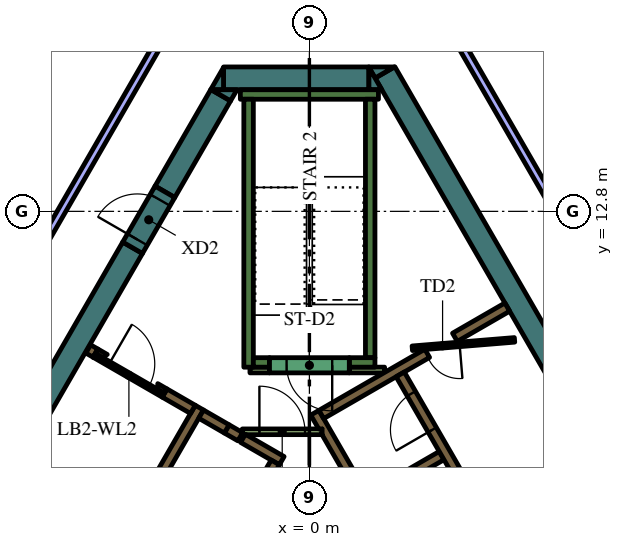
"""IFC4 building model, lengths in metres.
Left out: names, types, materials, properties, quantities, classifications, styles, units other than length and angle.
Written with IfcOpenShell. Run it as: python <this file> out.ifc"""

import sys

from ifc_helpers import new_model, si_unit, direction, frame, frame_2d, origin, place, context, subcontext, project, spatial, polyline, rectangle, outline, extrude, element, fill, save


model = new_model("IFC4")
c1 = context("Model", 3, precision=1e-05, world=origin(), true_north=direction((0.0, 1.0)))
c2 = subcontext(c1, "Body", "Model", "MODEL_VIEW")
j1 = project(units=[si_unit("LENGTHUNIT", "METRE"), si_unit("PLANEANGLEUNIT", "RADIAN")], contexts=[c1])
p1 = place(None, origin())
s1 = spatial("IfcSite", under=j1, at=p1, CompositionType="ELEMENT")
p2 = place(p1, origin())
s2 = spatial("IfcBuilding", under=s1, at=p2, CompositionType="ELEMENT")
p3 = place(p2, frame((0.0, 0.0, 288.0)))
s3 = spatial("IfcBuildingStorey", under=s2, at=p3, CompositionType="ELEMENT", Elevation=288.0)
p4 = place(p3, frame((1.989, 16.456, 0.0), z_axis=(0.0, 0.0, 1.0), x_axis=(0.49999102663, -0.8660305845, 0.0)))
e1 = element("IfcWall", 1, at=p4, inside=s3, PredefinedType="SOLIDWALL", context=c2, shape_type="SweptSolid", body=[
    extrude(rectangle(XDim=12.406, YDim=0.6, at=frame_2d((6.203, 0.0))), origin(), (0.0, 0.0, 1.0), 4.2),
])
p5 = place(p3, origin())
e2 = element("IfcWall", 2, at=p5, inside=s3, PredefinedType="SOLIDWALL", context=c2, shape_type="SweptSolid", body=[
    extrude(outline(polyline([(1.559, 16.6), (2.235, 16.6), (1.728, 16.307), (1.559, 16.6)])), origin(), (0.0, 0.0, 1.0), 4.2),
])
p6 = place(p3, frame((-2.258, 16.3, 0.0), z_axis=(0.0, 0.0, 1.0), x_axis=(1.0, 0.0, 0.0)))
e3 = element("IfcWall", 3, at=p6, inside=s3, PredefinedType="SOLIDWALL", context=c2, shape_type="SweptSolid", body=[
    extrude(rectangle(XDim=3.823, YDim=0.6, at=frame_2d((1.912, 0.0))), origin(), (0.0, 0.0, 1.0), 4.2),
])
e4 = element("IfcWall", 4, at=p5, inside=s3, PredefinedType="SOLIDWALL", context=c2, shape_type="SweptSolid", body=[
    extrude(outline(polyline([(1.905, 16.0), (1.567, 16.0), (1.567, 16.585), (1.905, 16.0)])), origin(), (0.0, 0.0, 1.0), 4.2),
])
e5 = element("IfcWall", 5, at=p5, inside=s3, PredefinedType="SOLIDWALL", context=c2, shape_type="SweptSolid", body=[
    extrude(outline(polyline([(-2.598, 16.0), (-2.26, 16.585), (-2.26, 16.0), (-2.598, 16.0)])), origin(), (0.0, 0.0, 1.0), 4.2),
])
p7 = place(p3, frame((-2.335, 15.855, 0.0), z_axis=(0.0, 0.0, 1.0), x_axis=(-0.499960127962, -0.866048422692, 0.0)))
e6 = element("IfcWall", 6, at=p7, inside=s3, PredefinedType="SOLIDWALL", context=c2, shape_type="SweptSolid", body=[
    extrude(rectangle(XDim=2.934, YDim=0.6, at=frame_2d((1.467, 0.0))), origin(), (0.0, 0.0, 1.0), 4.2),
])
e7 = element("IfcWall", 7, at=p5, inside=s3, PredefinedType="SOLIDWALL", context=c2, shape_type="SweptSolid", body=[
    extrude(outline(polyline([(-1.905, 16.0), (-2.074, 15.707), (-2.581, 16.0), (-1.905, 16.0)])), origin(), (0.0, 0.0, 1.0), 4.2),
])
e8 = element("IfcWall", 8, at=p5, inside=s3, PredefinedType="SOLIDWALL", context=c2, shape_type="SweptSolid", body=[
    extrude(outline(polyline([(-15.502, -6.35), (-4.912, 11.992), (-4.393, 11.692), (-10.815, 0.569), (-10.84, 0.583), (-10.84, 0.583), (-10.84, 0.583), (-10.965, 0.367), (-10.965, 0.367), (-10.965, 0.367), (-10.94, 0.352), (-11.033, 0.191), (-14.809, -6.35), (-15.156, -6.95), (-15.502, -6.35)])), origin(), (0.0, 0.0, 1.0), 4.2),
])
p8 = place(p3, frame((-1.817, 15.875, 0.0), z_axis=(0.0, 0.0, 1.0), x_axis=(1.0, 0.0, 0.0)))
e9 = element("IfcWall", 9, at=p8, inside=s3, PredefinedType="SOLIDWALL", context=c2, shape_type="SweptSolid", body=[
    extrude(rectangle(XDim=3.634, YDim=0.25, at=frame_2d((1.817, 0.0))), origin(), (0.0, 0.0, 1.0), 4.2),
])
p9 = place(p3, frame((1.6, 8.95, 0.0), z_axis=(0.0, 0.0, 1.0), x_axis=(0.0, 1.0, 0.0)))
e10 = element("IfcWall", 10, at=p9, inside=s3, PredefinedType="SOLIDWALL", context=c2, shape_type="SweptSolid", body=[
    extrude(rectangle(XDim=6.8, YDim=0.25, at=frame_2d((3.4, 0.0))), origin(), (0.0, 0.0, 1.0), 4.2),
])
p10 = place(p3, frame((1.05, 8.825, 0.0), z_axis=(0.0, 0.0, 1.0), x_axis=(1.0, 0.0, 0.0)))
e11 = element("IfcWall", 11, at=p10, inside=s3, PredefinedType="SOLIDWALL", context=c2, shape_type="SweptSolid", body=[
    extrude(rectangle(XDim=0.675, YDim=0.25, at=frame_2d((0.337, 0.0))), origin(), (0.0, 0.0, 1.0), 4.2),
])
p11 = place(p3, frame((-1.6, 8.7, 0.0), z_axis=(0.0, 0.0, 1.0), x_axis=(0.0, 1.0, 0.0)))
e12 = element("IfcWall", 12, at=p11, inside=s3, PredefinedType="SOLIDWALL", context=c2, shape_type="SweptSolid", body=[
    extrude(rectangle(XDim=7.05, YDim=0.25, at=frame_2d((3.525, 0.0))), origin(), (0.0, 0.0, 1.0), 4.2),
])
p12 = place(p3, frame((-1.475, 8.825, 0.0), z_axis=(0.0, 0.0, 1.0), x_axis=(1.0, 0.0, 0.0)))
e13 = element("IfcWall", 13, at=p12, inside=s3, PredefinedType="SOLIDWALL", context=c2, shape_type="SweptSolid", body=[
    extrude(rectangle(XDim=0.425, YDim=0.25, at=frame_2d((0.212, 0.0))), origin(), (0.0, 0.0, 1.0), 4.2),
])
e14 = element("IfcWall", 14, at=p5, inside=s3, PredefinedType="SOLIDWALL", context=c2, shape_type="SweptSolid", body=[
    extrude(outline(polyline([(0.332, 6.925), (0.335, 6.925), (0.335, 6.925), (0.335, 6.925), (0.335, 7.075), (0.335, 7.075), (0.335, 7.075), (0.245, 7.075), (0.035, 7.439), (0.252, 7.564), (0.377, 7.348), (1.512, 5.382), (1.637, 5.165), (2.221, 4.153), (2.771, 3.199), (2.896, 2.983), (3.138, 2.564), (4.031, 1.017), (4.156, 0.801), (5.292, -1.165), (5.417, -1.382), (6.073, -2.519), (6.552, -3.348), (6.677, -3.564), (6.46, -3.689), (0.332, 6.925)])), origin(), (0.0, 0.0, 1.0), 4.2),
])
p13 = place(p3, frame((3.1, 9.064, 0.0), z_axis=(0.0, 0.0, 1.0), x_axis=(-0.866030133475, -0.499991807846, 0.0)))
e15 = element("IfcWall", 15, at=p13, inside=s3, PredefinedType="SOLIDWALL", context=c2, shape_type="SweptSolid", body=[
    extrude(rectangle(XDim=3.217, YDim=0.25, at=frame_2d((1.608, 0.0))), origin(), (0.0, 0.0, 1.0), 4.2),
])
p14 = place(p3, frame((1.574, 5.274, 0.0), z_axis=(0.0, 0.0, 1.0), x_axis=(0.866028486751, 0.499994660107, 0.0)))
e16 = element("IfcWall", 16, at=p14, inside=s3, PredefinedType="SOLIDWALL", context=c2, shape_type="SweptSolid", body=[
    extrude(rectangle(XDim=2.2, YDim=0.25, at=frame_2d((1.1, 0.0))), origin(), (0.0, 0.0, 1.0), 4.2),
])
p15 = place(p3, frame((3.83, 9.486, 0.0), z_axis=(0.0, 0.0, 1.0), x_axis=(0.865986202621, 0.500067892261, 0.0)))
e17 = element("IfcWall", 17, at=p15, inside=s3, PredefinedType="SOLIDWALL", context=c2, shape_type="SweptSolid", body=[
    extrude(rectangle(XDim=1.591, YDim=0.25, at=frame_2d((0.795, 0.0))), origin(), (0.0, 0.0, 1.0), 4.2),
])
p16 = place(p3, frame((-8.06, -1.311, 0.0), z_axis=(0.0, 0.0, 1.0), x_axis=(0.50000273126, 0.866023826885, 0.0)))
e18 = element("IfcWall", 18, at=p16, inside=s3, PredefinedType="SOLIDWALL", context=c2, shape_type="SweptSolid", body=[
    extrude(rectangle(XDim=10.33, YDim=0.25, at=frame_2d((5.165, 0.0))), origin(), (0.0, 0.0, 1.0), 4.2),
])
p17 = place(p3, frame((-1.819, 6.87, 0.0), z_axis=(0.0, 0.0, 1.0), x_axis=(-0.866294599386, 0.499533449405, 0.0)))
e19 = element("IfcWall", 19, at=p17, inside=s3, PredefinedType="SOLIDWALL", context=c2, shape_type="SweptSolid", body=[
    extrude(rectangle(XDim=0.41, YDim=0.25, at=frame_2d((0.205, 0.0))), origin(), (0.0, 0.0, 1.0), 4.2),
])
p18 = place(p3, frame((-2.849, 7.465, 0.0), z_axis=(0.0, 0.0, 1.0), x_axis=(0.865955664968, -0.500120771724, 0.0)))
e20 = element("IfcWall", 20, at=p18, inside=s3, PredefinedType="SOLIDWALL", context=c2, shape_type="SweptSolid", body=[
    extrude(rectangle(XDim=0.778, YDim=0.25, at=frame_2d((0.389, 0.0))), origin(), (0.0, 0.0, 1.0), 4.2),
])
p19 = place(p3, frame((-0.728, 6.24, 0.0), z_axis=(0.0, 0.0, 1.0), x_axis=(-0.866002680491, 0.500039355833, 0.0)))
e21 = element("IfcWall", 21, at=p19, inside=s3, PredefinedType="SOLIDWALL", context=c2, shape_type="SweptSolid", body=[
    extrude(rectangle(XDim=1.178, YDim=0.25, at=frame_2d((0.589, 0.0))), origin(), (0.0, 0.0, 1.0), 4.2),
])
p20 = place(p3, frame((-5.629, 9.07, 0.0), z_axis=(0.0, 0.0, 1.0), x_axis=(-0.866185586049, 0.49972245349, 0.0)))
e22 = element("IfcWall", 22, at=p20, inside=s3, PredefinedType="SOLIDWALL", context=c2, shape_type="SweptSolid", body=[
    extrude(rectangle(XDim=0.22, YDim=0.25, at=frame_2d((0.11, 0.0))), origin(), (0.0, 0.0, 1.0), 4.2),
])
p21 = place(p3, frame((-3.809, 8.019, 0.0), z_axis=(0.0, 0.0, 1.0), x_axis=(0.866010229787, -0.500026281214, 0.0)))
e23 = element("IfcWall", 23, at=p21, inside=s3, PredefinedType="SOLIDWALL", context=c2, shape_type="SweptSolid", body=[
    extrude(rectangle(XDim=0.858, YDim=0.25, at=frame_2d((0.429, 0.0))), origin(), (0.0, 0.0, 1.0), 4.2),
])
e24 = element("IfcWall", 24, at=p5, inside=s3, PredefinedType="SOLIDWALL", context=c2, shape_type="SweptSolid", body=[
    extrude(outline(polyline([(-3.748, 8.128), (-3.813, 8.015), (-4.027, 8.139), (-4.017, 8.156), (-4.008, 8.173), (-4.0, 8.192), (-3.995, 8.21), (-3.991, 8.23), (-3.99, 8.25), (-3.99, 8.268), (-3.748, 8.128)])), origin(), (0.0, 0.0, 1.0), 4.2),
])
e25 = element("IfcWall", 25, at=p5, inside=s3, PredefinedType="SOLIDWALL", context=c2, shape_type="SweptSolid", body=[
    extrude(outline(polyline([(-5.689, 8.96), (-5.69, 8.961), (-5.565, 9.177), (-5.319, 9.035), (-5.335, 9.026), (-5.351, 9.015), (-5.366, 9.002), (-5.379, 8.988), (-5.392, 8.972), (-5.402, 8.956), (-5.412, 8.939), (-5.629, 9.064), (-5.629, 9.064), (-5.689, 8.96)])), origin(), (0.0, 0.0, 1.0), 4.2),
])
p22 = place(p3, frame((1.05, 8.625, 0.0), z_axis=(0.0, 0.0, 1.0), x_axis=(1.0, 0.0, 0.0)))
e26 = element("IfcWall", 26, at=p22, inside=s3, PredefinedType="PARTITIONING", context=c2, shape_type="SweptSolid", body=[
    extrude(rectangle(XDim=0.929, YDim=0.15, at=frame_2d((0.464, 0.0))), origin(), (0.0, 0.0, 1.0), 3.55),
])
p23 = place(p3, frame((-1.564, 8.625, 0.0), z_axis=(0.0, 0.0, 1.0), x_axis=(1.0, 0.0, 0.0)))
e27 = element("IfcWall", 27, at=p23, inside=s3, PredefinedType="PARTITIONING", context=c2, shape_type="SweptSolid", body=[
    extrude(rectangle(XDim=0.514, YDim=0.15, at=frame_2d((0.257, 0.0))), origin(), (0.0, 0.0, 1.0), 3.55),
])
p24 = place(p3, frame((8.565, -2.185, 0.0), z_axis=(0.0, 0.0, 1.0), x_axis=(-0.499997954832, 0.866026584559, 0.0)))
e28 = element("IfcWall", 28, at=p24, inside=s3, PredefinedType="SOLIDWALL", context=c2, shape_type="SweptSolid", body=[
    extrude(rectangle(XDim=12.35, YDim=0.25, at=frame_2d((6.175, 0.0))), origin(), (0.0, 0.0, 1.0), 4.2),
])
p25 = place(p24, frame((0.685, 0.0, 0.0)))
e29 = element("IfcOpeningElement", 29, at=p25, cuts=e28, PredefinedType="OPENING", context=c2, shape_type="SweptSolid", body=[
    extrude(rectangle(XDim=0.9, YDim=2.1, at=frame_2d((0.45, 1.05))), frame((0.0, 0.135, 0.0), z_axis=(0.0, -1.0, 0.0), x_axis=(1.0, 0.0, 0.0)), (0.0, 0.0, 1.0), 0.27),
])
p26 = place(p24, frame((3.105, 0.0, 0.0)))
e30 = element("IfcOpeningElement", 30, at=p26, cuts=e28, PredefinedType="OPENING", context=c2, shape_type="SweptSolid", body=[
    extrude(rectangle(XDim=1.1, YDim=2.1, at=frame_2d((0.55, 1.05))), frame((0.0, 0.135, 0.0), z_axis=(0.0, -1.0, 0.0), x_axis=(1.0, 0.0, 0.0)), (0.0, 0.0, 1.0), 0.27),
])
p27 = place(p24, frame((5.625, 0.0, 0.0)))
e31 = element("IfcOpeningElement", 31, at=p27, cuts=e28, PredefinedType="OPENING", context=c2, shape_type="SweptSolid", body=[
    extrude(rectangle(XDim=1.1, YDim=2.1, at=frame_2d((0.55, 1.05))), frame((0.0, 0.135, 0.0), z_axis=(0.0, -1.0, 0.0), x_axis=(1.0, 0.0, 0.0)), (0.0, 0.0, 1.0), 0.27),
])
p28 = place(p24, frame((8.145, 0.0, 0.0)))
e32 = element("IfcOpeningElement", 32, at=p28, cuts=e28, PredefinedType="OPENING", context=c2, shape_type="SweptSolid", body=[
    extrude(rectangle(XDim=1.1, YDim=2.1, at=frame_2d((0.55, 1.05))), frame((0.0, 0.135, 0.0), z_axis=(0.0, -1.0, 0.0), x_axis=(1.0, 0.0, 0.0)), (0.0, 0.0, 1.0), 0.27),
])
p29 = place(p24, frame((10.665, 0.0, 0.0)))
e33 = element("IfcOpeningElement", 33, at=p29, cuts=e28, PredefinedType="OPENING", context=c2, shape_type="SweptSolid", body=[
    extrude(rectangle(XDim=1.1, YDim=2.1, at=frame_2d((0.55, 1.05))), frame((0.0, 0.135, 0.0), z_axis=(0.0, -1.0, 0.0), x_axis=(1.0, 0.0, 0.0)), (0.0, 0.0, 1.0), 0.27),
])
p30 = place(p3, frame((-0.898, 6.194, 0.0), z_axis=(0.0, 0.0, 1.0), x_axis=(-0.499996202215, -0.866027596426, 0.0)))
e34 = element("IfcWall", 34, at=p30, inside=s3, PredefinedType="SOLIDWALL", context=c2, shape_type="SweptSolid", body=[
    extrude(rectangle(XDim=9.83, YDim=0.25, at=frame_2d((4.915, 0.0))), origin(), (0.0, 0.0, 1.0), 4.2),
])
p31 = place(p30, frame((0.585, 0.0, 0.0)))
e35 = element("IfcOpeningElement", 35, at=p31, cuts=e34, PredefinedType="OPENING", context=c2, shape_type="SweptSolid", body=[
    extrude(rectangle(XDim=1.1, YDim=2.1, at=frame_2d((0.55, 1.05))), frame((0.0, 0.135, 0.0), z_axis=(0.0, -1.0, 0.0), x_axis=(1.0, 0.0, 0.0)), (0.0, 0.0, 1.0), 0.27),
])
p32 = place(p30, frame((3.105, 0.0, 0.0)))
e36 = element("IfcOpeningElement", 36, at=p32, cuts=e34, PredefinedType="OPENING", context=c2, shape_type="SweptSolid", body=[
    extrude(rectangle(XDim=1.1, YDim=2.1, at=frame_2d((0.55, 1.05))), frame((0.0, 0.135, 0.0), z_axis=(0.0, -1.0, 0.0), x_axis=(1.0, 0.0, 0.0)), (0.0, 0.0, 1.0), 0.27),
])
p33 = place(p30, frame((5.625, 0.0, 0.0)))
e37 = element("IfcOpeningElement", 37, at=p33, cuts=e34, PredefinedType="OPENING", context=c2, shape_type="SweptSolid", body=[
    extrude(rectangle(XDim=1.1, YDim=2.1, at=frame_2d((0.55, 1.05))), frame((0.0, 0.135, 0.0), z_axis=(0.0, -1.0, 0.0), x_axis=(1.0, 0.0, 0.0)), (0.0, 0.0, 1.0), 0.27),
])
p34 = place(p30, frame((8.145, 0.0, 0.0)))
e38 = element("IfcOpeningElement", 38, at=p34, cuts=e34, PredefinedType="OPENING", context=c2, shape_type="SweptSolid", body=[
    extrude(rectangle(XDim=1.1, YDim=2.1, at=frame_2d((0.55, 1.05))), frame((0.0, 0.135, 0.0), z_axis=(0.0, -1.0, 0.0), x_axis=(1.0, 0.0, 0.0)), (0.0, 0.0, 1.0), 0.27),
])
p35 = place(p3, frame((1.05, 8.75, 0.0), z_axis=(0.0, 0.0, 1.0), x_axis=(-1.0, 0.0, 0.0)))
e39 = element("IfcWall", 39, at=p35, inside=s3, PredefinedType="SOLIDWALL", context=c2, shape_type="SweptSolid", body=[
    extrude(rectangle(XDim=2.1, YDim=0.4, at=frame_2d((1.05, 0.0))), origin(), (0.0, 0.0, 1.0), 4.2),
])
p36 = place(p35, frame((0.45, 0.0, 0.0)))
e40 = element("IfcOpeningElement", 40, at=p36, cuts=e39, PredefinedType="OPENING", context=c2, shape_type="SweptSolid", body=[
    extrude(rectangle(XDim=1.2, YDim=2.1, at=frame_2d((0.6, 1.05))), frame((0.0, 0.21, 0.0), z_axis=(0.0, -1.0, 0.0), x_axis=(1.0, 0.0, 0.0)), (0.0, 0.0, 1.0), 0.42),
])
p37 = place(p3, frame((5.398, 9.419, 0.0), z_axis=(0.0, 0.0, 1.0), x_axis=(-0.996653416376, -0.081743303248, 0.0)))
e41 = element("IfcWall", 41, at=p37, inside=s3, PredefinedType="PARTITIONING", context=c2, shape_type="SweptSolid", body=[
    extrude(rectangle(XDim=2.7, YDim=0.12, at=frame_2d((1.35, 0.0))), origin(), (0.0, 0.0, 1.0), 3.55),
])
p38 = place(p37, frame((1.45, 0.0, 0.0)))
e42 = element("IfcOpeningElement", 42, at=p38, cuts=e41, PredefinedType="OPENING", context=c2, shape_type="SweptSolid", body=[
    extrude(rectangle(XDim=0.9, YDim=2.1, at=frame_2d((0.45, 1.05))), frame((0.0, 0.07, 0.0), z_axis=(0.0, -1.0, 0.0), x_axis=(1.0, 0.0, 0.0)), (0.0, 0.0, 1.0), 0.14),
])
p39 = place(p3, frame((-1.765, 7.0, 0.0), z_axis=(0.0, 0.0, 1.0), x_axis=(1.0, 0.0, 0.0)))
e43 = element("IfcWall", 43, at=p39, inside=s3, PredefinedType="PARTITIONING", context=c2, shape_type="SweptSolid", body=[
    extrude(rectangle(XDim=2.1, YDim=0.15, at=frame_2d((1.05, 0.0))), origin(), (0.0, 0.0, 1.0), 3.55),
])
p40 = place(p39, frame((0.45, 0.0, 0.0)))
e44 = element("IfcOpeningElement", 44, at=p40, cuts=e43, PredefinedType="OPENING", context=c2, shape_type="SweptSolid", body=[
    extrude(rectangle(XDim=1.2, YDim=2.1, at=frame_2d((0.6, 1.05))), frame((0.0, 0.085, 0.0), z_axis=(0.0, -1.0, 0.0), x_axis=(1.0, 0.0, 0.0)), (0.0, 0.0, 1.0), 0.17),
])
p41 = place(p3, frame((-5.659, 9.012, 0.0), z_axis=(0.0, 0.0, 1.0), x_axis=(0.866009402589, -0.500027713859, 0.0)))
e45 = element("IfcWall", 45, at=p41, inside=s3, PredefinedType="PARTITIONING", context=c2, shape_type="SweptSolid", body=[
    extrude(rectangle(XDim=2.1, YDim=0.12, at=frame_2d((1.05, 0.0))), origin(), (0.0, 0.0, 1.0), 3.55),
])
p42 = place(p41, frame((0.45, 0.0, 0.0)))
e46 = element("IfcOpeningElement", 46, at=p42, cuts=e45, PredefinedType="OPENING", context=c2, shape_type="SweptSolid", body=[
    extrude(rectangle(XDim=1.2, YDim=2.1, at=frame_2d((0.6, 1.05))), frame((0.0, 0.07, 0.0), z_axis=(0.0, -1.0, 0.0), x_axis=(1.0, 0.0, 0.0)), (0.0, 0.0, 1.0), 0.14),
])
p43 = place(p3, frame((-4.652, 11.842, 0.0), z_axis=(0.0, 0.0, 1.0), x_axis=(0.500062241894, 0.865989465428, 0.0)))
e47 = element("IfcWall", 47, at=p43, inside=s3, PredefinedType="SOLIDWALL", context=c2, shape_type="SweptSolid", body=[
    extrude(rectangle(XDim=1.7, YDim=0.6, at=frame_2d((0.85, 0.0))), origin(), (0.0, 0.0, 1.0), 4.2),
])
p44 = place(p43, frame((0.25, 0.0, 0.0)))
e48 = element("IfcOpeningElement", 48, at=p44, cuts=e47, PredefinedType="OPENING", context=c2, shape_type="SweptSolid", body=[
    extrude(rectangle(XDim=1.2, YDim=2.1, at=frame_2d((0.6, 1.05))), frame((0.0, 0.31, 0.0), z_axis=(0.0, -1.0, 0.0), x_axis=(1.0, 0.0, 0.0)), (0.0, 0.0, 1.0), 0.62),
])
p45 = place(p3, frame((7.421, 11.247, 0.0), z_axis=(0.0, 0.0, 1.0), x_axis=(-0.499999024953, 0.866025966727, 0.0)))
e49 = element("IfcWall", 49, at=p45, inside=s3, PredefinedType="PARTITIONING", context=c2, shape_type="SweptSolid", body=[
    extrude(rectangle(XDim=7.769, YDim=0.2, at=frame_2d((3.884, 0.0))), origin(), (0.0, 0.0, 1.0), 3.55),
])
p46 = place(p3, frame((-7.962, 15.8, 0.0), z_axis=(0.0, 0.0, 1.0), x_axis=(0.599541489613, 0.800343677574, 0.0)))
e50 = element("IfcWall", 50, at=p46, inside=s3, PredefinedType="PARTITIONING", context=c2, shape_type="SweptSolid", body=[
    extrude(rectangle(XDim=4.942, YDim=0.15, at=frame_2d((2.471, 0.0))), origin(), (0.0, 0.0, 1.0), 3.55),
])
p47 = place(p46, frame((2.042, 0.0, 0.0)))
e51 = element("IfcOpeningElement", 51, at=p47, cuts=e50, PredefinedType="OPENING", context=c2, shape_type="SweptSolid", body=[
    extrude(rectangle(XDim=0.9, YDim=2.1, at=frame_2d((0.45, 1.05))), frame((0.0, 0.085, 0.0), z_axis=(0.0, -1.0, 0.0), x_axis=(1.0, 0.0, 0.0)), (0.0, 0.0, 1.0), 0.17),
])
p48 = place(p3, frame((-3.306, 18.374, 0.0), z_axis=(0.0, 0.0, 1.0), x_axis=(-0.499999798456, -0.866025520146, 0.0)))
e52 = element("IfcWall", 52, at=p48, inside=s3, PredefinedType="PARTITIONING", context=c2, shape_type="SweptSolid", body=[
    extrude(rectangle(XDim=8.229, YDim=0.2, at=frame_2d((4.115, 0.0))), origin(), (0.0, 0.0, 1.0), 3.55),
])
p49 = place(p29, origin())
e53 = element("IfcDoor", 53, at=p49, inside=s3, OperationType="DOUBLE_DOOR_SLIDING", PredefinedType="DOOR", context=c2, shape_type="SweptSolid", body=[
    extrude(rectangle(XDim=1.1, YDim=2.1, at=frame_2d((0.55, 1.05))), frame((0.0, 0.025, 0.0), z_axis=(0.0, -1.0, 0.0), x_axis=(1.0, 0.0, 0.0)), (0.0, 0.0, 1.0), 0.05),
])
fill(e33, e53)
p50 = place(p36, origin())
e54 = element("IfcDoor", 54, at=p50, inside=s3, OperationType="SINGLE_SWING_LEFT", PredefinedType="DOOR", context=c2, shape_type="SweptSolid", body=[
    extrude(rectangle(XDim=1.2, YDim=2.1, at=frame_2d((0.6, 1.05))), frame((0.0, 0.025, 0.0), z_axis=(0.0, -1.0, 0.0), x_axis=(1.0, 0.0, 0.0)), (0.0, 0.0, 1.0), 0.05),
])
fill(e40, e54)
p51 = place(p38, origin())
e55 = element("IfcDoor", 55, at=p51, inside=s3, OperationType="SINGLE_SWING_LEFT", PredefinedType="DOOR", context=c2, shape_type="SweptSolid", body=[
    extrude(rectangle(XDim=0.9, YDim=2.1, at=frame_2d((0.45, 1.05))), frame((0.0, 0.025, 0.0), z_axis=(0.0, -1.0, 0.0), x_axis=(1.0, 0.0, 0.0)), (0.0, 0.0, 1.0), 0.05),
])
fill(e42, e55)
p52 = place(p40, origin())
e56 = element("IfcDoor", 56, at=p52, inside=s3, OperationType="SINGLE_SWING_LEFT", PredefinedType="DOOR", context=c2, shape_type="SweptSolid", body=[
    extrude(rectangle(XDim=1.2, YDim=2.1, at=frame_2d((0.6, 1.05))), frame((0.0, 0.025, 0.0), z_axis=(0.0, -1.0, 0.0), x_axis=(1.0, 0.0, 0.0)), (0.0, 0.0, 1.0), 0.05),
])
fill(e44, e56)
p53 = place(p42, origin())
e57 = element("IfcDoor", 57, at=p53, inside=s3, OperationType="SINGLE_SWING_LEFT", PredefinedType="DOOR", context=c2, shape_type="SweptSolid", body=[
    extrude(rectangle(XDim=1.2, YDim=2.1, at=frame_2d((0.6, 1.05))), frame((0.0, 0.025, 0.0), z_axis=(0.0, -1.0, 0.0), x_axis=(1.0, 0.0, 0.0)), (0.0, 0.0, 1.0), 0.05),
])
fill(e46, e57)
p54 = place(p44, origin())
e58 = element("IfcDoor", 58, at=p54, inside=s3, OperationType="SINGLE_SWING_LEFT", PredefinedType="DOOR", context=c2, shape_type="SweptSolid", body=[
    extrude(rectangle(XDim=1.2, YDim=2.1, at=frame_2d((0.6, 1.05))), frame((0.0, 0.025, 0.0), z_axis=(0.0, -1.0, 0.0), x_axis=(1.0, 0.0, 0.0)), (0.0, 0.0, 1.0), 0.05),
])
fill(e48, e58)
save(model, sys.argv[1])
